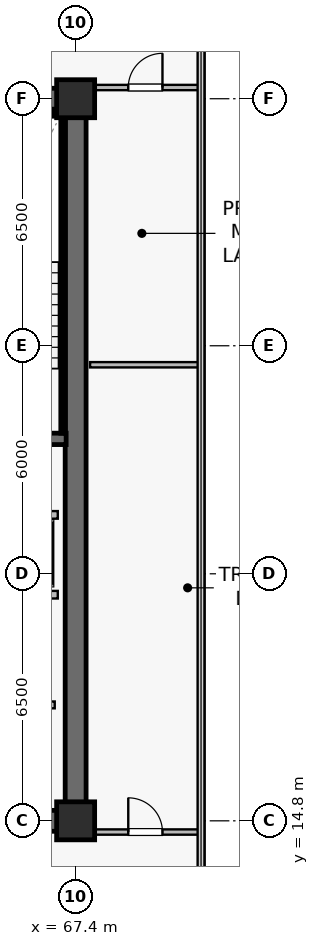
"""IFC4 building model, lengths in metres.
Left out: names, types, materials, properties, quantities, classifications, styles, units other than length and angle.
Written with IfcOpenShell. Run it as: python <this file> out.ifc"""

import sys

from ifc_helpers import new_model, si_unit, direction, frame, frame_2d, origin, origin_2d, place, context, subcontext, project, spatial, rectangle, extrude, source, transform, mapped, element, fill, save


model = new_model("IFC4")
c1 = context("Model", 3, precision=1e-05, world=origin(), true_north=direction((0.0, 1.0)))
c2 = subcontext(c1, "Body", "Model", "MODEL_VIEW")
j1 = project(units=[si_unit("LENGTHUNIT", "METRE"), si_unit("PLANEANGLEUNIT", "RADIAN")], contexts=[c1])
p1 = place(None, origin())
s1 = spatial("IfcSite", under=j1, at=p1, CompositionType="ELEMENT")
p2 = place(p1, origin())
s2 = spatial("IfcBuilding", under=s1, at=p2, CompositionType="ELEMENT")
p3 = place(p2, frame((0.0, 0.0, 205.5)))
s3 = spatial("IfcBuildingStorey", under=s2, at=p3, CompositionType="ELEMENT", Elevation=205.5)
p4 = place(p3, frame((52.325, 14.8, 0.0), z_axis=(0.0, 0.0, 1.0), x_axis=(1.0, 0.0, 0.0)))
e1 = element("IfcWall", 1, at=p4, inside=s3, PredefinedType="SHEAR", context=c2, shape_type="SweptSolid", body=[
    extrude(rectangle(XDim=15.35, YDim=0.55, at=frame_2d((7.675, 0.0))), origin(), (0.0, 0.0, 1.0), 3.8),
])
p5 = place(p3, frame((52.325, 33.8, 0.0), z_axis=(0.0, 0.0, 1.0), x_axis=(1.0, 0.0, 0.0)))
e2 = element("IfcWall", 2, at=p5, inside=s3, PredefinedType="SHEAR", context=c2, shape_type="SweptSolid", body=[
    extrude(rectangle(XDim=15.35, YDim=0.55, at=frame_2d((7.675, 0.0))), origin(), (0.0, 0.0, 1.0), 3.8),
])
p6 = place(p5, frame((8.775, 0.0, 0.0)))
e3 = element("IfcOpeningElement", 3, at=p6, cuts=e2, PredefinedType="OPENING", context=c2, shape_type="SweptSolid", body=[
    extrude(rectangle(XDim=0.95, YDim=2.15, at=frame_2d((0.475, 1.075))), frame((0.0, 0.285, 0.0), z_axis=(0.0, -1.0, 0.0), x_axis=(1.0, 0.0, 0.0)), (0.0, 0.0, 1.0), 0.57),
])
p7 = place(p5, frame((5.41, 0.0, 0.0)))
e4 = element("IfcOpeningElement", 4, at=p7, cuts=e2, PredefinedType="OPENING", context=c2, shape_type="SweptSolid", body=[
    extrude(rectangle(XDim=0.95, YDim=2.15, at=frame_2d((0.475, 1.075))), frame((0.0, 0.285, 0.0), z_axis=(0.0, -1.0, 0.0), x_axis=(1.0, 0.0, 0.0)), (0.0, 0.0, 1.0), 0.57),
])
p8 = place(p5, frame((2.01, 0.0, 0.0)))
e5 = element("IfcOpeningElement", 5, at=p8, cuts=e2, PredefinedType="OPENING", context=c2, shape_type="SweptSolid", body=[
    extrude(rectangle(XDim=0.95, YDim=2.15, at=frame_2d((0.475, 1.075))), frame((0.0, 0.285, 0.0), z_axis=(0.0, -1.0, 0.0), x_axis=(1.0, 0.0, 0.0)), (0.0, 0.0, 1.0), 0.57),
])
p9 = place(p3, frame((67.4, 15.075, 0.0), z_axis=(0.0, 0.0, 1.0), x_axis=(0.0, 1.0, 0.0)))
e6 = element("IfcWall", 6, at=p9, inside=s3, PredefinedType="SHEAR", context=c2, shape_type="SweptSolid", body=[
    extrude(rectangle(XDim=18.45, YDim=0.55, at=frame_2d((9.225, 0.0))), origin(), (0.0, 0.0, 1.0), 3.8),
])
p10 = place(p3, frame((63.35, 24.85, 0.0), z_axis=(0.0, 0.0, 1.0), x_axis=(1.0, 0.0, 0.0)))
e7 = element("IfcWall", 7, at=p10, inside=s3, PredefinedType="SHEAR", context=c2, shape_type="SweptSolid", body=[
    extrude(rectangle(XDim=3.8, YDim=0.3, at=frame_2d((1.9, 0.0))), origin(), (0.0, 0.0, 1.0), 3.8),
])
p11 = place(p3, frame((63.35, 33.4, 0.0), z_axis=(0.0, 0.0, 1.0), x_axis=(1.0, 0.0, 0.0)))
e8 = element("IfcWall", 8, at=p11, inside=s3, PredefinedType="SOLIDWALL", context=c2, shape_type="SweptSolid", body=[
    extrude(rectangle(XDim=3.72, YDim=0.12, at=frame_2d((1.86, 0.0))), origin(), (0.0, 0.0, 1.0), 3.8),
])
p12 = place(p3, frame((67.07, 25.0, 0.0), z_axis=(0.0, 0.0, 1.0), x_axis=(0.0, 1.0, 0.0)))
e9 = element("IfcWall", 9, at=p12, inside=s3, PredefinedType="SOLIDWALL", context=c2, shape_type="SweptSolid", body=[
    extrude(rectangle(XDim=8.32, YDim=0.12, at=frame_2d((4.16, 0.0))), origin(), (0.0, 0.0, 1.0), 3.8),
])
m1 = source(origin(), c2, "Body", "SweptSolid", [
    extrude(rectangle(XDim=1.0, YDim=1.0, at=origin_2d()), origin(), (0.0, 0.0, 1.0), 4.1),
])
for number, where, z_axis, x_axis in (
    (10, (67.4, 14.8, 0.0), (0.0, 0.0, 1.0), (1.0, 0.0, 0.0)),
    (11, (67.4, 33.8, 0.0), (0.0, 0.0, 1.0), (1.0, 0.0, 0.0)),
):
    element("IfcColumn", number, at=place(p3, frame(where, z_axis=z_axis, x_axis=x_axis)), inside=s3, PredefinedType="COLUMN", context=c2, shape_type="MappedRepresentation", body=[
        mapped(m1, transform((0.0, 0.0, 0.0), scale=1.0)),
    ])
p13 = place(p3, frame((64.67, 20.75, 0.0), z_axis=(0.0, 0.0, 1.0), x_axis=(1.0, 0.0, 0.0)))
e12 = element("IfcWall", 12, at=p13, inside=s3, PredefinedType="SOLIDWALL", context=c2, shape_type="SweptSolid", body=[
    extrude(rectangle(XDim=2.26, YDim=0.2, at=frame_2d((1.13, 0.0))), origin(), (0.0, 0.0, 1.0), 3.8),
])
p14 = place(p13, frame((0.58, 0.0, 0.0)))
e13 = element("IfcOpeningElement", 13, at=p14, cuts=e12, PredefinedType="OPENING", context=c2, shape_type="SweptSolid", body=[
    extrude(rectangle(XDim=1.1, YDim=2.22, at=frame_2d((0.55, 1.11))), frame((0.0, 0.11, 0.0), z_axis=(0.0, -1.0, 0.0), x_axis=(1.0, 0.0, 0.0)), (0.0, 0.0, 1.0), 0.22),
])
p15 = place(p3, frame((64.67, 22.85, 0.0), z_axis=(0.0, 0.0, 1.0), x_axis=(1.0, 0.0, 0.0)))
e14 = element("IfcWall", 14, at=p15, inside=s3, PredefinedType="SOLIDWALL", context=c2, shape_type="SweptSolid", body=[
    extrude(rectangle(XDim=2.26, YDim=0.2, at=frame_2d((1.13, 0.0))), origin(), (0.0, 0.0, 1.0), 3.8),
])
p16 = place(p3, frame((61.85, 17.85, 0.0), z_axis=(0.0, 0.0, 1.0), x_axis=(1.0, 0.0, 0.0)))
e15 = element("IfcWall", 15, at=p16, inside=s3, PredefinedType="SOLIDWALL", context=c2, shape_type="SweptSolid", body=[
    extrude(rectangle(XDim=5.0, YDim=0.18, at=frame_2d((2.5, 0.0))), origin(), (0.0, 0.0, 1.0), 3.8),
])
p17 = place(p16, frame((2.025, 0.0, 0.0)))
e16 = element("IfcOpeningElement", 16, at=p17, cuts=e15, PredefinedType="OPENING", context=c2, shape_type="SweptSolid", body=[
    extrude(rectangle(XDim=0.95, YDim=2.15, at=frame_2d((0.475, 1.075))), frame((0.0, 0.1, 0.0), z_axis=(0.0, -1.0, 0.0), x_axis=(1.0, 0.0, 0.0)), (0.0, 0.0, 1.0), 0.2),
])
p18 = place(p3, frame((67.78, 26.8, 0.0), z_axis=(0.0, 0.0, 1.0), x_axis=(1.0, 0.0, 0.0)))
e17 = element("IfcWall", 17, at=p18, inside=s3, PredefinedType="PARTITIONING", context=c2, shape_type="SweptSolid", body=[
    extrude(rectangle(XDim=2.91, YDim=0.14, at=frame_2d((1.455, 0.0))), origin(), (0.0, 0.0, 1.0), 3.8),
])
p19 = place(p3, frame((67.78, 14.505, 0.0), z_axis=(0.0, 0.0, 1.0), x_axis=(1.0, 0.0, 0.0)))
e18 = element("IfcWall", 18, at=p19, inside=s3, PredefinedType="PARTITIONING", context=c2, shape_type="SweptSolid", body=[
    extrude(rectangle(XDim=2.91, YDim=0.14, at=frame_2d((1.455, 0.0))), origin(), (0.0, 0.0, 1.0), 3.8),
])
p20 = place(p19, frame((1.005, 0.0, 0.0)))
e19 = element("IfcOpeningElement", 19, at=p20, cuts=e18, PredefinedType="OPENING", context=c2, shape_type="SweptSolid", body=[
    extrude(rectangle(XDim=0.9, YDim=2.1, at=frame_2d((0.45, 1.05))), frame((0.0, 0.08, 0.0), z_axis=(0.0, -1.0, 0.0), x_axis=(1.0, 0.0, 0.0)), (0.0, 0.0, 1.0), 0.16),
])
p21 = place(p3, frame((67.78, 34.095, 0.0), z_axis=(0.0, 0.0, 1.0), x_axis=(1.0, 0.0, 0.0)))
e20 = element("IfcWall", 20, at=p21, inside=s3, PredefinedType="PARTITIONING", context=c2, shape_type="SweptSolid", body=[
    extrude(rectangle(XDim=2.91, YDim=0.14, at=frame_2d((1.455, 0.0))), origin(), (0.0, 0.0, 1.0), 3.8),
])
p22 = place(p21, frame((1.005, 0.0, 0.0)))
e21 = element("IfcOpeningElement", 21, at=p22, cuts=e20, PredefinedType="OPENING", context=c2, shape_type="SweptSolid", body=[
    extrude(rectangle(XDim=0.9, YDim=2.1, at=frame_2d((0.45, 1.05))), frame((0.0, 0.08, 0.0), z_axis=(0.0, -1.0, 0.0), x_axis=(1.0, 0.0, 0.0)), (0.0, 0.0, 1.0), 0.16),
])
m2 = source(origin(), c2, "Body", "SweptSolid", [
    extrude(rectangle(XDim=0.9, YDim=2.1, at=frame_2d((0.45, 1.05))), frame((0.0, 0.025, 0.0), z_axis=(0.0, -1.0, 0.0), x_axis=(1.0, 0.0, 0.0)), (0.0, 0.0, 1.0), 0.05),
])
p23 = place(p20, origin())
e22 = element("IfcDoor", 22, at=p23, inside=s3, OperationType="SINGLE_SWING_LEFT", PredefinedType="DOOR", context=c2, shape_type="MappedRepresentation", body=[
    mapped(m2, transform((0.0, 0.0, 0.0), scale=1.0)),
])
fill(e19, e22)
p24 = place(p22, origin())
e23 = element("IfcDoor", 23, at=p24, inside=s3, OperationType="SINGLE_SWING_RIGHT", PredefinedType="DOOR", context=c2, shape_type="MappedRepresentation", body=[
    mapped(m2, transform((0.0, 0.0, 0.0), scale=1.0)),
])
fill(e21, e23)
save(model, sys.argv[1])
